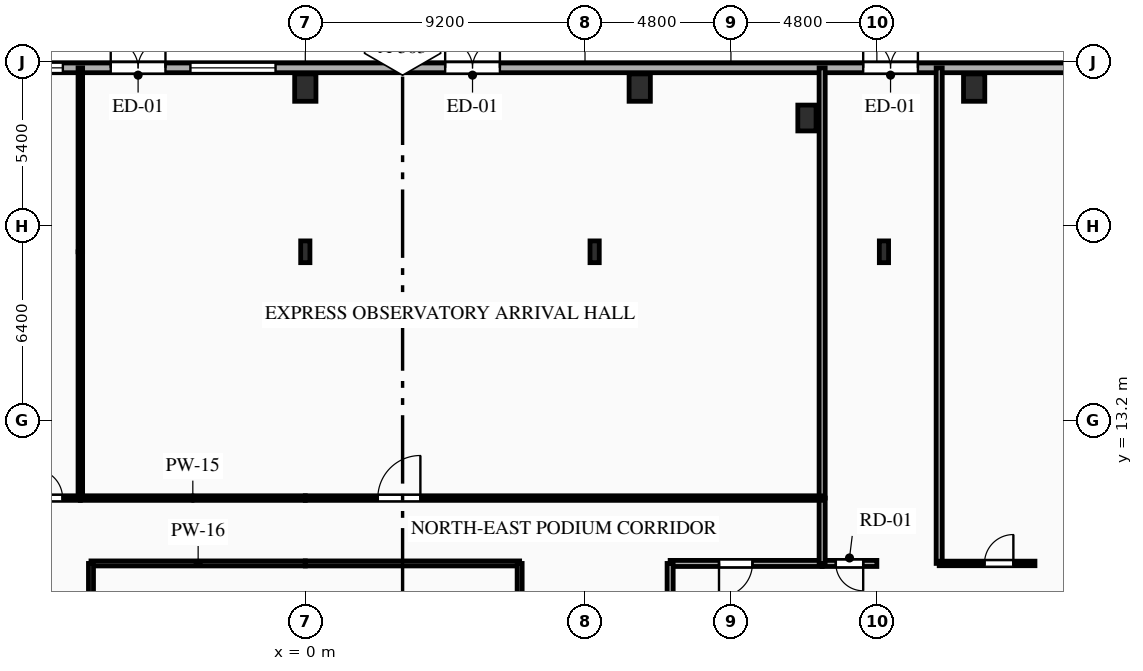
"""IFC4 building model, lengths in metres.
Left out: names, types, materials, properties, quantities, classifications, styles, units other than length and angle.
Written with IfcOpenShell. Run it as: python <this file> out.ifc"""

import sys

from ifc_helpers import new_model, si_unit, direction, frame, frame_2d, origin, origin_2d, place, context, subcontext, project, spatial, rectangle, i_section, extrude, element, fill, save


model = new_model("IFC4")
c1 = context("Model", 3, precision=1e-05, world=origin(), true_north=direction((0.0, 1.0)))
c2 = subcontext(c1, "Body", "Model", "MODEL_VIEW")
j1 = project(units=[si_unit("LENGTHUNIT", "METRE"), si_unit("PLANEANGLEUNIT", "RADIAN")], contexts=[c1])
p1 = place(None, origin())
s1 = spatial("IfcSite", under=j1, at=p1, CompositionType="ELEMENT")
p2 = place(p1, origin())
s2 = spatial("IfcBuilding", under=s1, at=p2, CompositionType="ELEMENT")
p3 = place(p2, origin())
s3 = spatial("IfcBuildingStorey", under=s2, at=p3, CompositionType="ELEMENT", Elevation=0.0)
for number, where, z_axis, x_axis in (
    (1, (0.0, 24.15, 0.0), (0.0, 0.0, 1.0), (1.0, 0.0, 0.0)),
    (2, (11.0, 24.15, 0.0), (0.0, 0.0, 1.0), (1.0, 0.0, 0.0)),
    (3, (22.0, 24.15, 0.0), (0.0, 0.0, 1.0), (1.0, 0.0, 0.0)),
):
    element("IfcColumn", number, at=place(p3, frame(where, z_axis=z_axis, x_axis=x_axis)), inside=s3, PredefinedType="COLUMN", context=c2, shape_type="SweptSolid", body=[
        extrude(rectangle(XDim=0.7, YDim=0.9, at=origin_2d()), origin(), (0.0, 0.0, 1.0), 4.5),
    ])
p4 = place(p3, frame((16.5, 23.15, 0.0), z_axis=(0.0, 0.0, 1.0), x_axis=(1.0, 0.0, 0.0)))
e4 = element("IfcColumn", 4, at=p4, inside=s3, PredefinedType="PILASTER", context=c2, shape_type="SweptSolid", body=[
    extrude(rectangle(XDim=0.6, YDim=0.85, at=origin_2d()), origin(), (0.0, 0.0, 1.0), 4.5),
])
for number, where, z_axis, x_axis in (
    (5, (19.033, 18.75, 0.0), (0.0, 0.0, 1.0), (1.0, 0.0, 0.0)),
    (6, (9.517, 18.75, 0.0), (0.0, 0.0, 1.0), (1.0, 0.0, 0.0)),
    (7, (0.0, 18.75, 0.0), (0.0, 0.0, 1.0), (1.0, 0.0, 0.0)),
):
    element("IfcColumn", number, at=place(p3, frame(where, z_axis=z_axis, x_axis=x_axis)), inside=s3, PredefinedType="COLUMN", context=c2, shape_type="SweptSolid", body=[
        extrude(i_section(OverallWidth=0.304, OverallDepth=0.716, WebThickness=0.021, FlangeThickness=0.04, FilletRadius=0.027, at=origin_2d()), origin(), (0.0, 0.0, 1.0), 4.5),
    ])
p5 = place(p3, frame((-38.3, 24.8, 0.0), z_axis=(0.0, 0.0, 1.0), x_axis=(1.0, 0.0, 0.0)))
e8 = element("IfcWall", 8, at=p5, inside=s3, PredefinedType="SOLIDWALL", context=c2, shape_type="SweptSolid", body=[
    extrude(rectangle(XDim=76.6, YDim=0.32, at=frame_2d((38.3, 0.0))), origin(), (0.0, 0.0, 1.0), 4.17),
])
p6 = place(p5, frame((18.15, 0.0, 0.0)))
e9 = element("IfcOpeningElement", 9, at=p6, cuts=e8, PredefinedType="OPENING", context=c2, shape_type="SweptSolid", body=[
    extrude(rectangle(XDim=1.8, YDim=2.4, at=frame_2d((0.9, 1.2))), frame((0.0, 0.17, 0.0), z_axis=(0.0, -1.0, 0.0), x_axis=(1.0, 0.0, 0.0)), (0.0, 0.0, 1.0), 0.34),
])
p7 = place(p5, frame((31.9, 0.0, 0.0)))
e10 = element("IfcOpeningElement", 10, at=p7, cuts=e8, PredefinedType="OPENING", context=c2, shape_type="SweptSolid", body=[
    extrude(rectangle(XDim=1.8, YDim=2.4, at=frame_2d((0.9, 1.2))), frame((0.0, 0.17, 0.0), z_axis=(0.0, -1.0, 0.0), x_axis=(1.0, 0.0, 0.0)), (0.0, 0.0, 1.0), 0.34),
])
p8 = place(p5, frame((42.9, 0.0, 0.0)))
e11 = element("IfcOpeningElement", 11, at=p8, cuts=e8, PredefinedType="OPENING", context=c2, shape_type="SweptSolid", body=[
    extrude(rectangle(XDim=1.8, YDim=2.4, at=frame_2d((0.9, 1.2))), frame((0.0, 0.17, 0.0), z_axis=(0.0, -1.0, 0.0), x_axis=(1.0, 0.0, 0.0)), (0.0, 0.0, 1.0), 0.34),
])
p9 = place(p5, frame((56.65, 0.0, 0.0)))
e12 = element("IfcOpeningElement", 12, at=p9, cuts=e8, PredefinedType="OPENING", context=c2, shape_type="SweptSolid", body=[
    extrude(rectangle(XDim=1.8, YDim=2.4, at=frame_2d((0.9, 1.2))), frame((0.0, 0.17, 0.0), z_axis=(0.0, -1.0, 0.0), x_axis=(1.0, 0.0, 0.0)), (0.0, 0.0, 1.0), 0.34),
])
p10 = place(p5, frame((14.838, 0.0, 0.85)))
e13 = element("IfcOpeningElement", 13, at=p10, cuts=e8, PredefinedType="OPENING", context=c2, shape_type="SweptSolid", body=[
    extrude(rectangle(XDim=1.1, YDim=1.85, at=frame_2d((0.55, 0.925))), frame((0.0, 0.17, 0.0), z_axis=(0.0, -1.0, 0.0), x_axis=(1.0, 0.0, 0.0)), (0.0, 0.0, 1.0), 0.34),
])
p11 = place(p5, frame((22.973, 0.0, 0.85)))
e14 = element("IfcOpeningElement", 14, at=p11, cuts=e8, PredefinedType="OPENING", context=c2, shape_type="SweptSolid", body=[
    extrude(rectangle(XDim=2.8, YDim=2.4, at=frame_2d((1.4, 1.2))), frame((0.0, 0.17, 0.0), z_axis=(0.0, -1.0, 0.0), x_axis=(1.0, 0.0, 0.0)), (0.0, 0.0, 1.0), 0.34),
])
p12 = place(p5, frame((28.025, 0.0, 0.85)))
e15 = element("IfcOpeningElement", 15, at=p12, cuts=e8, PredefinedType="OPENING", context=c2, shape_type="SweptSolid", body=[
    extrude(rectangle(XDim=2.3, YDim=2.4, at=frame_2d((1.15, 1.2))), frame((0.0, 0.17, 0.0), z_axis=(0.0, -1.0, 0.0), x_axis=(1.0, 0.0, 0.0)), (0.0, 0.0, 1.0), 0.34),
])
p13 = place(p5, frame((34.521, 0.0, 0.85)))
e16 = element("IfcOpeningElement", 16, at=p13, cuts=e8, PredefinedType="OPENING", context=c2, shape_type="SweptSolid", body=[
    extrude(rectangle(XDim=2.8, YDim=2.4, at=frame_2d((1.4, 1.2))), frame((0.0, 0.17, 0.0), z_axis=(0.0, -1.0, 0.0), x_axis=(1.0, 0.0, 0.0)), (0.0, 0.0, 1.0), 0.34),
])
p14 = place(p3, frame((18.8, 8.5, 0.0), z_axis=(0.0, 0.0, 1.0), x_axis=(-1.0, 0.0, 0.0)))
e17 = element("IfcWall", 17, at=p14, inside=s3, PredefinedType="PARTITIONING", context=c2, shape_type="SweptSolid", body=[
    extrude(rectangle(XDim=1.8, YDim=0.2, at=frame_2d((0.9, 0.0))), origin(), (0.0, 0.0, 1.0), 4.17),
])
p15 = place(p14, frame((0.45, 0.0, 0.0)))
e18 = element("IfcOpeningElement", 18, at=p15, cuts=e17, PredefinedType="OPENING", context=c2, shape_type="SweptSolid", body=[
    extrude(rectangle(XDim=0.9, YDim=2.1, at=frame_2d((0.45, 1.05))), frame((0.0, 0.11, 0.0), z_axis=(0.0, -1.0, 0.0), x_axis=(1.0, 0.0, 0.0)), (0.0, 0.0, 1.0), 0.22),
])
p16 = place(p3, frame((17.0, 8.5, 0.0), z_axis=(0.0, 0.0, 1.0), x_axis=(-1.0, 0.0, 0.0)))
e19 = element("IfcWall", 19, at=p16, inside=s3, PredefinedType="PARTITIONING", context=c2, shape_type="SweptSolid", body=[
    extrude(rectangle(XDim=5.0, YDim=0.2, at=frame_2d((2.5, 0.0))), origin(), (0.0, 0.0, 1.0), 4.17),
])
p17 = place(p16, frame((2.292, 0.0, 0.0)))
e20 = element("IfcOpeningElement", 20, at=p17, cuts=e19, PredefinedType="OPENING", context=c2, shape_type="SweptSolid", body=[
    extrude(rectangle(XDim=1.1, YDim=2.15, at=frame_2d((0.55, 1.075))), frame((0.0, 0.11, 0.0), z_axis=(0.0, -1.0, 0.0), x_axis=(1.0, 0.0, 0.0)), (0.0, 0.0, 1.0), 0.22),
])
p18 = place(p3, frame((12.0, 8.5, 0.0), z_axis=(0.0, 0.0, 1.0), x_axis=(0.0, -1.0, 0.0)))
e21 = element("IfcWall", 21, at=p18, inside=s3, PredefinedType="PARTITIONING", context=c2, shape_type="SweptSolid", body=[
    extrude(rectangle(XDim=2.9, YDim=0.2, at=frame_2d((1.45, 0.0))), origin(), (0.0, 0.0, 1.0), 4.17),
])
p19 = place(p3, frame((17.0, 8.5, 0.0), z_axis=(0.0, 0.0, 1.0), x_axis=(0.0, 1.0, 0.0)))
e22 = element("IfcWall", 22, at=p19, inside=s3, PredefinedType="PARTITIONING", context=c2, shape_type="SweptSolid", body=[
    extrude(rectangle(XDim=2.15, YDim=0.2, at=frame_2d((1.075, 0.0))), origin(), (0.0, 0.0, 1.0), 4.17),
])
p20 = place(p3, frame((17.0, 10.65, 0.0), z_axis=(0.0, 0.0, 1.0), x_axis=(0.0, 1.0, 0.0)))
e23 = element("IfcWall", 23, at=p20, inside=s3, PredefinedType="PARTITIONING", context=c2, shape_type="SweptSolid", body=[
    extrude(rectangle(XDim=14.15, YDim=0.2, at=frame_2d((7.075, 0.0))), origin(), (0.0, 0.0, 1.0), 4.17),
])
p21 = place(p3, frame((20.85, 24.8, 0.0), z_axis=(0.0, 0.0, 1.0), x_axis=(0.0, -1.0, 0.0)))
e24 = element("IfcWall", 24, at=p21, inside=s3, PredefinedType="PARTITIONING", context=c2, shape_type="SweptSolid", body=[
    extrude(rectangle(XDim=16.3, YDim=0.2, at=frame_2d((8.15, 0.0))), origin(), (0.0, 0.0, 1.0), 4.17),
])
p22 = place(p3, frame((-9.52, 10.65, 0.0), z_axis=(0.0, 0.0, 1.0), x_axis=(1.0, 0.0, 0.0)))
e25 = element("IfcWall", 25, at=p22, inside=s3, PredefinedType="PARTITIONING", context=c2, shape_type="SweptSolid", body=[
    extrude(rectangle(XDim=2.12, YDim=0.15, at=frame_2d((1.06, 0.0))), origin(), (0.0, 0.0, 1.0), 4.17),
])
p23 = place(p22, frame((0.585, 0.0, 0.0)))
e26 = element("IfcOpeningElement", 26, at=p23, cuts=e25, PredefinedType="OPENING", context=c2, shape_type="SweptSolid", body=[
    extrude(rectangle(XDim=0.95, YDim=2.1, at=frame_2d((0.475, 1.05))), frame((0.0, 0.085, 0.0), z_axis=(0.0, -1.0, 0.0), x_axis=(1.0, 0.0, 0.0)), (0.0, 0.0, 1.0), 0.17),
])
p24 = place(p3, frame((-7.4, 10.65, 0.0), z_axis=(0.0, 0.0, 1.0), x_axis=(1.0, 0.0, 0.0)))
e27 = element("IfcWall", 27, at=p24, inside=s3, PredefinedType="PARTITIONING", context=c2, shape_type="SweptSolid", body=[
    extrude(rectangle(XDim=7.4, YDim=0.15, at=frame_2d((3.7, 0.0))), origin(), (0.0, 0.0, 1.0), 4.17),
])
p25 = place(p3, frame((0.0, 8.5, 0.0), z_axis=(0.0, 0.0, 1.0), x_axis=(-1.0, 0.0, 0.0)))
e28 = element("IfcWall", 28, at=p25, inside=s3, PredefinedType="PARTITIONING", context=c2, shape_type="SweptSolid", body=[
    extrude(rectangle(XDim=7.05, YDim=0.165, at=frame_2d((3.525, 0.0))), origin(), (0.0, 0.0, 1.0), 4.17),
])
p26 = place(p3, frame((0.0, 10.65, 0.0), z_axis=(0.0, 0.0, 1.0), x_axis=(1.0, 0.0, 0.0)))
e29 = element("IfcWall", 29, at=p26, inside=s3, PredefinedType="PARTITIONING", context=c2, shape_type="SweptSolid", body=[
    extrude(rectangle(XDim=17.0, YDim=0.15, at=frame_2d((8.5, 0.0))), origin(), (0.0, 0.0, 1.0), 4.17),
])
p27 = place(p26, frame((2.385, 0.0, 0.0)))
e30 = element("IfcOpeningElement", 30, at=p27, cuts=e29, PredefinedType="OPENING", context=c2, shape_type="SweptSolid", body=[
    extrude(rectangle(XDim=1.4, YDim=2.3, at=frame_2d((0.7, 1.15))), frame((0.0, 0.085, 0.0), z_axis=(0.0, -1.0, 0.0), x_axis=(1.0, 0.0, 0.0)), (0.0, 0.0, 1.0), 0.17),
])
p28 = place(p3, frame((7.05, 8.5, 0.0), z_axis=(0.0, 0.0, 1.0), x_axis=(-1.0, 0.0, 0.0)))
e31 = element("IfcWall", 31, at=p28, inside=s3, PredefinedType="PARTITIONING", context=c2, shape_type="SweptSolid", body=[
    extrude(rectangle(XDim=7.05, YDim=0.165, at=frame_2d((3.525, 0.0))), origin(), (0.0, 0.0, 1.0), 4.17),
])
p29 = place(p3, frame((-7.05, 8.5, 0.0), z_axis=(0.0, 0.0, 1.0), x_axis=(0.0, -1.0, 0.0)))
e32 = element("IfcWall", 32, at=p29, inside=s3, PredefinedType="PARTITIONING", context=c2, shape_type="SweptSolid", body=[
    extrude(rectangle(XDim=14.1, YDim=0.165, at=frame_2d((7.05, 0.0))), origin(), (0.0, 0.0, 1.0), 4.17),
])
p30 = place(p29, frame((7.949, 0.0, 0.0)))
e33 = element("IfcOpeningElement", 33, at=p30, cuts=e32, PredefinedType="OPENING", context=c2, shape_type="SweptSolid", body=[
    extrude(rectangle(XDim=1.15, YDim=2.15, at=frame_2d((0.575, 1.075))), frame((0.0, 0.093, 0.0), z_axis=(0.0, -1.0, 0.0), x_axis=(1.0, 0.0, 0.0)), (0.0, 0.0, 1.0), 0.185),
])
p31 = place(p3, frame((7.05, -5.6, 0.0), z_axis=(0.0, 0.0, 1.0), x_axis=(0.0, 1.0, 0.0)))
e34 = element("IfcWall", 34, at=p31, inside=s3, PredefinedType="PARTITIONING", context=c2, shape_type="SweptSolid", body=[
    extrude(rectangle(XDim=14.1, YDim=0.165, at=frame_2d((7.05, 0.0))), origin(), (0.0, 0.0, 1.0), 4.17),
])
p32 = place(p3, frame((20.85, 8.5, 0.0), z_axis=(0.0, 0.0, 1.0), x_axis=(1.0, 0.0, 0.0)))
e35 = element("IfcWall", 35, at=p32, inside=s3, PredefinedType="PARTITIONING", context=c2, shape_type="SweptSolid", body=[
    extrude(rectangle(XDim=3.15, YDim=0.15, at=frame_2d((1.575, 0.0))), origin(), (0.0, 0.0, 1.0), 4.17),
])
p33 = place(p32, frame((1.49, 0.0, 0.0)))
e36 = element("IfcOpeningElement", 36, at=p33, cuts=e35, PredefinedType="OPENING", context=c2, shape_type="SweptSolid", body=[
    extrude(rectangle(XDim=0.95, YDim=2.1, at=frame_2d((0.475, 1.05))), frame((0.0, 0.085, 0.0), z_axis=(0.0, -1.0, 0.0), x_axis=(1.0, 0.0, 0.0)), (0.0, 0.0, 1.0), 0.17),
])
p34 = place(p3, frame((-7.4, 18.75, 0.0), z_axis=(0.0, 0.0, 1.0), x_axis=(0.0, -1.0, 0.0)))
e37 = element("IfcWall", 37, at=p34, inside=s3, PredefinedType="PARTITIONING", context=c2, shape_type="SweptSolid", body=[
    extrude(rectangle(XDim=8.1, YDim=0.15, at=frame_2d((4.05, 0.0))), origin(), (0.0, 0.0, 1.0), 4.17),
])
p35 = place(p3, frame((-7.4, 24.8, 0.0), z_axis=(0.0, 0.0, 1.0), x_axis=(0.0, -1.0, 0.0)))
e38 = element("IfcWall", 38, at=p35, inside=s3, PredefinedType="PARTITIONING", context=c2, shape_type="SweptSolid", body=[
    extrude(rectangle(XDim=6.05, YDim=0.15, at=frame_2d((3.025, 0.0))), origin(), (0.0, 0.0, 1.0), 4.17),
])
p36 = place(p7, origin())
e39 = element("IfcDoor", 39, at=p36, inside=s3, OperationType="DOUBLE_DOOR_SINGLE_SWING", PredefinedType="DOOR", context=c2, shape_type="SweptSolid", body=[
    extrude(rectangle(XDim=1.8, YDim=2.4, at=frame_2d((0.9, 1.2))), frame((0.0, 0.025, 0.0), z_axis=(0.0, -1.0, 0.0), x_axis=(1.0, 0.0, 0.0)), (0.0, 0.0, 1.0), 0.05),
])
fill(e10, e39)
p37 = place(p8, origin())
e40 = element("IfcDoor", 40, at=p37, inside=s3, OperationType="DOUBLE_DOOR_SINGLE_SWING", PredefinedType="DOOR", context=c2, shape_type="SweptSolid", body=[
    extrude(rectangle(XDim=1.8, YDim=2.4, at=frame_2d((0.9, 1.2))), frame((0.0, 0.025, 0.0), z_axis=(0.0, -1.0, 0.0), x_axis=(1.0, 0.0, 0.0)), (0.0, 0.0, 1.0), 0.05),
])
fill(e11, e40)
p38 = place(p9, origin())
e41 = element("IfcDoor", 41, at=p38, inside=s3, OperationType="DOUBLE_DOOR_SINGLE_SWING", PredefinedType="DOOR", context=c2, shape_type="SweptSolid", body=[
    extrude(rectangle(XDim=1.8, YDim=2.4, at=frame_2d((0.9, 1.2))), frame((0.0, 0.025, 0.0), z_axis=(0.0, -1.0, 0.0), x_axis=(1.0, 0.0, 0.0)), (0.0, 0.0, 1.0), 0.05),
])
fill(e12, e41)
p39 = place(p12, origin())
e42 = element("IfcWindow", 42, at=p39, inside=s3, PartitioningType="SINGLE_PANEL", PredefinedType="WINDOW", context=c2, shape_type="SweptSolid", body=[
    extrude(rectangle(XDim=2.3, YDim=2.4, at=frame_2d((1.15, 1.2))), frame((0.0, 0.03, 0.0), z_axis=(0.0, -1.0, 0.0), x_axis=(1.0, 0.0, 0.0)), (0.0, 0.0, 1.0), 0.06),
])
fill(e15, e42)
p40 = place(p13, origin())
e43 = element("IfcWindow", 43, at=p40, inside=s3, PartitioningType="SINGLE_PANEL", PredefinedType="WINDOW", context=c2, shape_type="SweptSolid", body=[
    extrude(rectangle(XDim=2.8, YDim=2.4, at=frame_2d((1.4, 1.2))), frame((0.0, 0.03, 0.0), z_axis=(0.0, -1.0, 0.0), x_axis=(1.0, 0.0, 0.0)), (0.0, 0.0, 1.0), 0.06),
])
fill(e16, e43)
p41 = place(p15, origin())
e44 = element("IfcDoor", 44, at=p41, inside=s3, OperationType="SINGLE_SWING_LEFT", PredefinedType="DOOR", context=c2, shape_type="SweptSolid", body=[
    extrude(rectangle(XDim=0.9, YDim=2.1, at=frame_2d((0.45, 1.05))), frame((0.0, 0.025, 0.0), z_axis=(0.0, -1.0, 0.0), x_axis=(1.0, 0.0, 0.0)), (0.0, 0.0, 1.0), 0.05),
])
fill(e18, e44)
p42 = place(p17, origin())
e45 = element("IfcDoor", 45, at=p42, inside=s3, OperationType="SINGLE_SWING_RIGHT", PredefinedType="DOOR", context=c2, shape_type="SweptSolid", body=[
    extrude(rectangle(XDim=1.1, YDim=2.15, at=frame_2d((0.55, 1.075))), frame((0.0, 0.025, 0.0), z_axis=(0.0, -1.0, 0.0), x_axis=(1.0, 0.0, 0.0)), (0.0, 0.0, 1.0), 0.05),
])
fill(e20, e45)
p43 = place(p23, origin())
e46 = element("IfcDoor", 46, at=p43, inside=s3, OperationType="SINGLE_SWING_LEFT", PredefinedType="DOOR", context=c2, shape_type="SweptSolid", body=[
    extrude(rectangle(XDim=0.95, YDim=2.1, at=frame_2d((0.475, 1.05))), frame((0.0, 0.025, 0.0), z_axis=(0.0, -1.0, 0.0), x_axis=(1.0, 0.0, 0.0)), (0.0, 0.0, 1.0), 0.05),
])
fill(e26, e46)
p44 = place(p27, origin())
e47 = element("IfcDoor", 47, at=p44, inside=s3, OperationType="SINGLE_SWING_RIGHT", PredefinedType="DOOR", context=c2, shape_type="SweptSolid", body=[
    extrude(rectangle(XDim=1.4, YDim=2.3, at=frame_2d((0.7, 1.15))), frame((0.0, 0.025, 0.0), z_axis=(0.0, -1.0, 0.0), x_axis=(1.0, 0.0, 0.0)), (0.0, 0.0, 1.0), 0.05),
])
fill(e30, e47)
p45 = place(p33, origin())
e48 = element("IfcDoor", 48, at=p45, inside=s3, OperationType="SINGLE_SWING_RIGHT", PredefinedType="DOOR", context=c2, shape_type="SweptSolid", body=[
    extrude(rectangle(XDim=0.95, YDim=2.1, at=frame_2d((0.475, 1.05))), frame((0.0, 0.025, 0.0), z_axis=(0.0, -1.0, 0.0), x_axis=(1.0, 0.0, 0.0)), (0.0, 0.0, 1.0), 0.05),
])
fill(e36, e48)
save(model, sys.argv[1])
